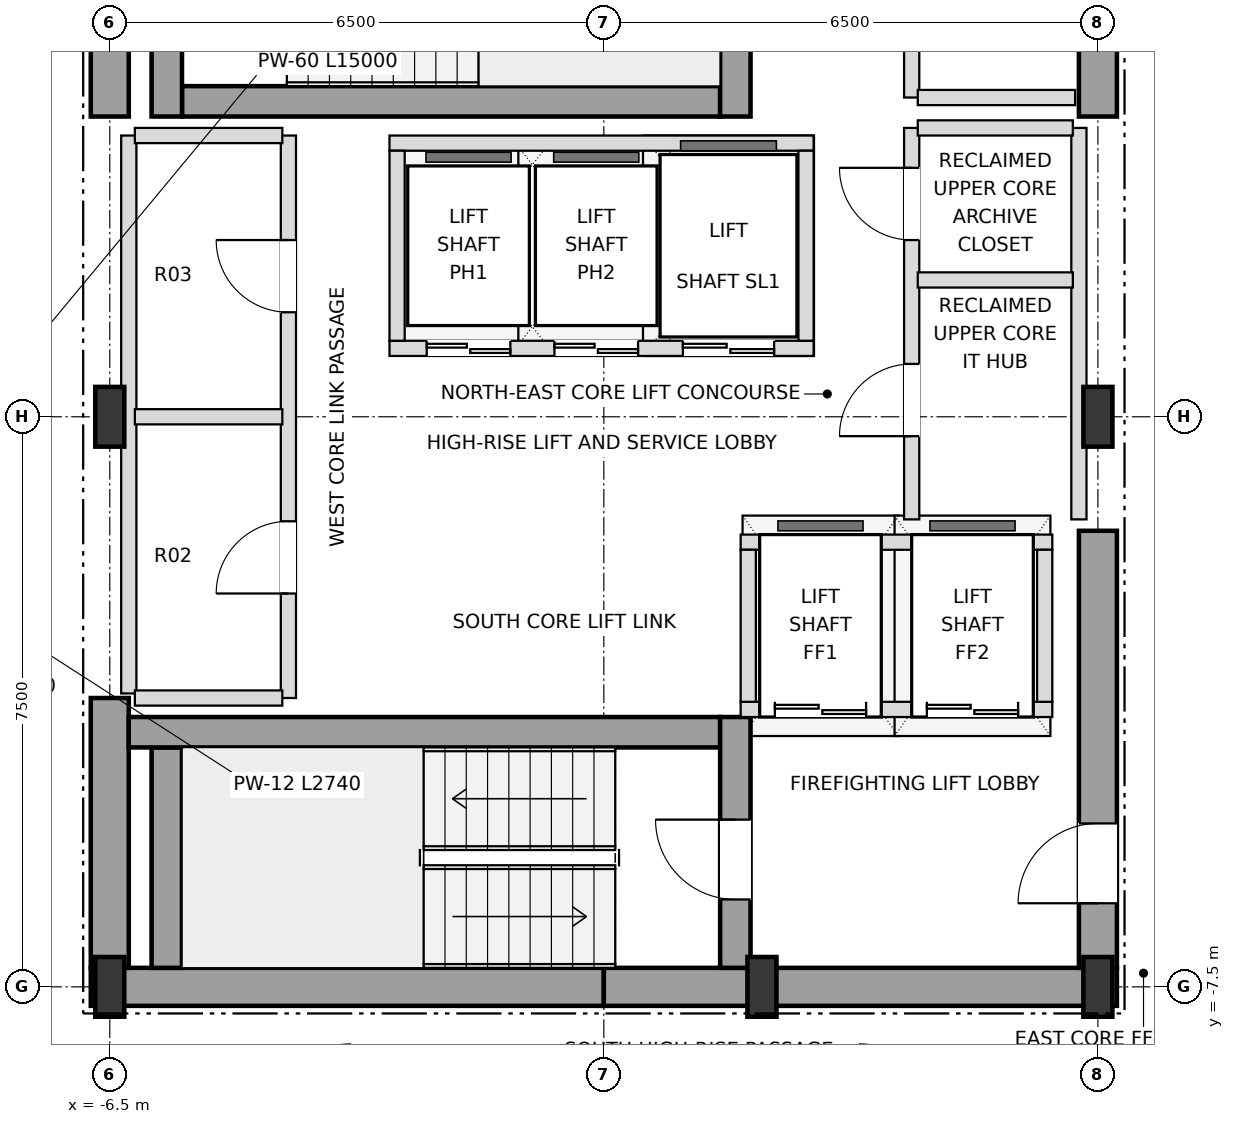
"""IFC4 building model, lengths in metres.
Left out: names, types, materials, properties, quantities, classifications, styles, units other than length and angle.
Written with IfcOpenShell. Run it as: python <this file> out.ifc"""

import sys

from ifc_helpers import new_model, si_unit, direction, frame, frame_2d, origin, origin_2d, place, context, subcontext, project, spatial, rectangle, i_section, extrude, element, fill, save


model = new_model("IFC4")
c1 = context("Model", 3, precision=1e-05, world=origin(), true_north=direction((0.0, 1.0)))
c2 = subcontext(c1, "Body", "Model", "MODEL_VIEW")
j1 = project(units=[si_unit("LENGTHUNIT", "METRE"), si_unit("PLANEANGLEUNIT", "RADIAN")], contexts=[c1])
p1 = place(None, origin())
s1 = spatial("IfcSite", under=j1, at=p1, CompositionType="ELEMENT")
p2 = place(p1, origin())
s2 = spatial("IfcBuilding", under=s1, at=p2, CompositionType="ELEMENT")
p3 = place(p2, frame((0.0, 0.0, 287.1)))
s3 = spatial("IfcBuildingStorey", under=s2, at=p3, CompositionType="ELEMENT", Elevation=287.1)
for number, where, z_axis, x_axis in (
    (1, (-6.5, -7.5, 0.0), (0.0, 0.0, 1.0), (1.0, 0.0, 0.0)),
    (2, (2.08, -7.5, 0.0), (0.0, 0.0, 1.0), (1.0, 0.0, 0.0)),
    (3, (6.5, -7.5, 0.0), (0.0, 0.0, 1.0), (1.0, 0.0, 0.0)),
    (4, (-6.5, 0.0, 0.0), (0.0, 0.0, 1.0), (1.0, 0.0, 0.0)),
    (5, (6.5, 0.0, 0.0), (0.0, 0.0, 1.0), (1.0, 0.0, 0.0)),
):
    element("IfcColumn", number, at=place(p3, frame(where, z_axis=z_axis, x_axis=x_axis)), inside=s3, PredefinedType="COLUMN", context=c2, shape_type="SweptSolid", body=[
        extrude(i_section(OverallWidth=0.382, OverallDepth=0.786, WebThickness=0.02, FlangeThickness=0.033, at=origin_2d()), origin(), (0.0, 0.0, 1.0), 3.6),
    ])
for number, where, z_axis, x_axis in (
    (6, (-6.75, -7.5, 0.0), (0.0, 0.0, 1.0), (1.0, 0.0, 0.0)),
    (7, (0.0, -7.5, 0.0), (0.0, 0.0, 1.0), (1.0, 0.0, 0.0)),
):
    element("IfcWall", number, at=place(p3, frame(where, z_axis=z_axis, x_axis=x_axis)), inside=s3, PredefinedType="SHEAR", context=c2, shape_type="SweptSolid", body=[
        extrude(rectangle(XDim=6.75, YDim=0.5, at=frame_2d((3.375, 0.0))), origin(), (0.0, 0.0, 1.0), 3.38),
    ])
p4 = place(p3, frame((-6.5, -7.25, 0.0), z_axis=(0.0, 0.0, 1.0), x_axis=(0.0, 1.0, 0.0)))
e8 = element("IfcWall", 8, at=p4, inside=s3, PredefinedType="SHEAR", context=c2, shape_type="SweptSolid", body=[
    extrude(rectangle(XDim=3.55, YDim=0.5, at=frame_2d((1.775, 0.0))), origin(), (0.0, 0.0, 1.0), 3.38),
])
p5 = place(p3, frame((-6.5, 3.95, 0.0), z_axis=(0.0, 0.0, 1.0), x_axis=(0.0, 1.0, 0.0)))
e9 = element("IfcWall", 9, at=p5, inside=s3, PredefinedType="SHEAR", context=c2, shape_type="SweptSolid", body=[
    extrude(rectangle(XDim=3.3, YDim=0.5, at=frame_2d((1.65, 0.0))), origin(), (0.0, 0.0, 1.0), 3.38),
])
p6 = place(p3, frame((6.5, -7.25, 0.0), z_axis=(0.0, 0.0, 1.0), x_axis=(0.0, 1.0, 0.0)))
e10 = element("IfcWall", 10, at=p6, inside=s3, PredefinedType="SHEAR", context=c2, shape_type="SweptSolid", body=[
    extrude(rectangle(XDim=5.75, YDim=0.5, at=frame_2d((2.875, 0.0))), origin(), (0.0, 0.0, 1.0), 3.38),
])
p7 = place(p6, frame((0.85, 0.0, 0.0)))
e11 = element("IfcOpeningElement", 11, at=p7, cuts=e10, PredefinedType="OPENING", context=c2, shape_type="SweptSolid", body=[
    extrude(rectangle(XDim=1.05, YDim=2.15, at=frame_2d((0.525, 1.075))), frame((0.0, 0.26, 0.0), z_axis=(0.0, -1.0, 0.0), x_axis=(1.0, 0.0, 0.0)), (0.0, 0.0, 1.0), 0.52),
])
p8 = place(p3, frame((6.5, 3.95, 0.0), z_axis=(0.0, 0.0, 1.0), x_axis=(0.0, 1.0, 0.0)))
e12 = element("IfcWall", 12, at=p8, inside=s3, PredefinedType="SHEAR", context=c2, shape_type="SweptSolid", body=[
    extrude(rectangle(XDim=3.3, YDim=0.5, at=frame_2d((1.65, 0.0))), origin(), (0.0, 0.0, 1.0), 3.38),
])
p9 = place(p3, frame((-5.75, -7.25, 0.0), z_axis=(0.0, 0.0, 1.0), x_axis=(0.0, 1.0, 0.0)))
e13 = element("IfcWall", 13, at=p9, inside=s3, PredefinedType="SHEAR", context=c2, shape_type="SweptSolid", body=[
    extrude(rectangle(XDim=2.9, YDim=0.4, at=frame_2d((1.45, 0.0))), origin(), (0.0, 0.0, 1.0), 3.38),
])
p10 = place(p3, frame((-6.25, -4.15, 0.0), z_axis=(0.0, 0.0, 1.0), x_axis=(1.0, 0.0, 0.0)))
e14 = element("IfcWall", 14, at=p10, inside=s3, PredefinedType="SHEAR", context=c2, shape_type="SweptSolid", body=[
    extrude(rectangle(XDim=7.78, YDim=0.4, at=frame_2d((3.89, 0.0))), origin(), (0.0, 0.0, 1.0), 3.38),
])
p11 = place(p3, frame((1.73, -7.25, 0.0), z_axis=(0.0, 0.0, 1.0), x_axis=(0.0, 1.0, 0.0)))
e15 = element("IfcWall", 15, at=p11, inside=s3, PredefinedType="SHEAR", context=c2, shape_type="SweptSolid", body=[
    extrude(rectangle(XDim=3.3, YDim=0.4, at=frame_2d((1.65, 0.0))), origin(), (0.0, 0.0, 1.0), 3.38),
])
p12 = place(p11, frame((0.9, 0.0, 0.0)))
e16 = element("IfcOpeningElement", 16, at=p12, cuts=e15, PredefinedType="OPENING", context=c2, shape_type="SweptSolid", body=[
    extrude(rectangle(XDim=1.05, YDim=2.15, at=frame_2d((0.525, 1.075))), frame((0.0, 0.21, 0.0), z_axis=(0.0, -1.0, 0.0), x_axis=(1.0, 0.0, 0.0)), (0.0, 0.0, 1.0), 0.42),
])
p13 = place(p3, frame((-5.55, 4.15, 0.0), z_axis=(0.0, 0.0, 1.0), x_axis=(1.0, 0.0, 0.0)))
e17 = element("IfcWall", 17, at=p13, inside=s3, PredefinedType="SHEAR", context=c2, shape_type="SweptSolid", body=[
    extrude(rectangle(XDim=7.08, YDim=0.4, at=frame_2d((3.54, 0.0))), origin(), (0.0, 0.0, 1.0), 3.38),
])
for number, where, z_axis, x_axis in (
    (18, (1.73, 3.95, 0.0), (0.0, 0.0, 1.0), (0.0, 1.0, 0.0)),
    (19, (-5.75, 3.95, 0.0), (0.0, 0.0, 1.0), (0.0, 1.0, 0.0)),
):
    element("IfcWall", number, at=place(p3, frame(where, z_axis=z_axis, x_axis=x_axis)), inside=s3, PredefinedType="SHEAR", context=c2, shape_type="SweptSolid", body=[
        extrude(rectangle(XDim=3.3, YDim=0.4, at=frame_2d((1.65, 0.0))), origin(), (0.0, 0.0, 1.0), 3.38),
    ])
p14 = place(p3, frame((-2.82, 0.9, 0.0), z_axis=(0.0, 0.0, 1.0), x_axis=(1.0, 0.0, 0.0)))
e20 = element("IfcWall", 20, at=p14, inside=s3, PredefinedType="SOLIDWALL", context=c2, shape_type="SweptSolid", body=[
    extrude(rectangle(XDim=5.58, YDim=0.2, at=frame_2d((2.79, 0.0))), origin(), (0.0, 0.0, 1.0), 3.38),
])
p15 = place(p14, frame((0.49, 0.0, 0.0)))
e21 = element("IfcOpeningElement", 21, at=p15, cuts=e20, PredefinedType="OPENING", context=c2, shape_type="SweptSolid", body=[
    extrude(rectangle(XDim=1.1, YDim=2.15, at=frame_2d((0.55, 1.075))), frame((0.0, 0.11, 0.0), z_axis=(0.0, -1.0, 0.0), x_axis=(1.0, 0.0, 0.0)), (0.0, 0.0, 1.0), 0.22),
])
p16 = place(p14, frame((2.17, 0.0, 0.0)))
e22 = element("IfcOpeningElement", 22, at=p16, cuts=e20, PredefinedType="OPENING", context=c2, shape_type="SweptSolid", body=[
    extrude(rectangle(XDim=1.1, YDim=2.15, at=frame_2d((0.55, 1.075))), frame((0.0, 0.11, 0.0), z_axis=(0.0, -1.0, 0.0), x_axis=(1.0, 0.0, 0.0)), (0.0, 0.0, 1.0), 0.22),
])
p17 = place(p14, frame((3.86, 0.0, 0.0)))
e23 = element("IfcOpeningElement", 23, at=p17, cuts=e20, PredefinedType="OPENING", context=c2, shape_type="SweptSolid", body=[
    extrude(rectangle(XDim=1.2, YDim=2.2, at=frame_2d((0.6, 1.1))), frame((0.0, 0.11, 0.0), z_axis=(0.0, -1.0, 0.0), x_axis=(1.0, 0.0, 0.0)), (0.0, 0.0, 1.0), 0.22),
])
p18 = place(p3, frame((-2.82, 3.6, 0.0), z_axis=(0.0, 0.0, 1.0), x_axis=(1.0, 0.0, 0.0)))
e24 = element("IfcWall", 24, at=p18, inside=s3, PredefinedType="SOLIDWALL", context=c2, shape_type="SweptSolid", body=[
    extrude(rectangle(XDim=5.58, YDim=0.2, at=frame_2d((2.79, 0.0))), origin(), (0.0, 0.0, 1.0), 3.38),
])
for number, where, z_axis, x_axis in (
    (25, (-2.72, 1.0, 0.0), (0.0, 0.0, 1.0), (0.0, 1.0, 0.0)),
    (26, (2.66, 1.0, 0.0), (0.0, 0.0, 1.0), (0.0, 1.0, 0.0)),
):
    element("IfcWall", number, at=place(p3, frame(where, z_axis=z_axis, x_axis=x_axis)), inside=s3, PredefinedType="SOLIDWALL", context=c2, shape_type="SweptSolid", body=[
        extrude(rectangle(XDim=2.5, YDim=0.2, at=frame_2d((1.25, 0.0))), origin(), (0.0, 0.0, 1.0), 3.38),
    ])
p19 = place(p3, frame((1.8, -3.85, 0.0), z_axis=(0.0, 0.0, 1.0), x_axis=(1.0, 0.0, 0.0)))
e27 = element("IfcWall", 27, at=p19, inside=s3, PredefinedType="SOLIDWALL", context=c2, shape_type="SweptSolid", body=[
    extrude(rectangle(XDim=4.1, YDim=0.2, at=frame_2d((2.05, 0.0))), origin(), (0.0, 0.0, 1.0), 3.38),
])
p20 = place(p19, frame((0.45, 0.0, 0.0)))
e28 = element("IfcOpeningElement", 28, at=p20, cuts=e27, PredefinedType="OPENING", context=c2, shape_type="SweptSolid", body=[
    extrude(rectangle(XDim=1.2, YDim=2.2, at=frame_2d((0.6, 1.1))), frame((0.0, 0.11, 0.0), z_axis=(0.0, -1.0, 0.0), x_axis=(1.0, 0.0, 0.0)), (0.0, 0.0, 1.0), 0.22),
])
p21 = place(p19, frame((2.45, 0.0, 0.0)))
e29 = element("IfcOpeningElement", 29, at=p21, cuts=e27, PredefinedType="OPENING", context=c2, shape_type="SweptSolid", body=[
    extrude(rectangle(XDim=1.2, YDim=2.2, at=frame_2d((0.6, 1.1))), frame((0.0, 0.11, 0.0), z_axis=(0.0, -1.0, 0.0), x_axis=(1.0, 0.0, 0.0)), (0.0, 0.0, 1.0), 0.22),
])
p22 = place(p3, frame((1.8, -1.65, 0.0), z_axis=(0.0, 0.0, 1.0), x_axis=(1.0, 0.0, 0.0)))
e30 = element("IfcWall", 30, at=p22, inside=s3, PredefinedType="SOLIDWALL", context=c2, shape_type="SweptSolid", body=[
    extrude(rectangle(XDim=4.1, YDim=0.2, at=frame_2d((2.05, 0.0))), origin(), (0.0, 0.0, 1.0), 3.38),
])
for number, where, z_axis, x_axis in (
    (31, (1.9, -3.75, 0.0), (0.0, 0.0, 1.0), (0.0, 1.0, 0.0)),
    (32, (5.8, -3.75, 0.0), (0.0, 0.0, 1.0), (0.0, 1.0, 0.0)),
):
    element("IfcWall", number, at=place(p3, frame(where, z_axis=z_axis, x_axis=x_axis)), inside=s3, PredefinedType="SOLIDWALL", context=c2, shape_type="SweptSolid", body=[
        extrude(rectangle(XDim=2.0, YDim=0.2, at=frame_2d((1.0, 0.0))), origin(), (0.0, 0.0, 1.0), 3.38),
    ])
p23 = place(p3, frame((-6.25, -3.64, 0.0), z_axis=(0.0, 0.0, 1.0), x_axis=(0.0, 1.0, 0.0)))
e33 = element("IfcWall", 33, at=p23, inside=s3, PredefinedType="SOLIDWALL", context=c2, shape_type="SweptSolid", body=[
    extrude(rectangle(XDim=7.34, YDim=0.2, at=frame_2d((3.67, 0.0))), origin(), (0.0, 0.0, 1.0), 3.38),
])
p24 = place(p3, frame((-4.15, -3.7, 0.0), z_axis=(0.0, 0.0, 1.0), x_axis=(0.0, 1.0, 0.0)))
e34 = element("IfcWall", 34, at=p24, inside=s3, PredefinedType="SOLIDWALL", context=c2, shape_type="SweptSolid", body=[
    extrude(rectangle(XDim=7.4, YDim=0.2, at=frame_2d((3.7, 0.0))), origin(), (0.0, 0.0, 1.0), 3.38),
])
p25 = place(p24, frame((1.375, 0.0, 0.0)))
e35 = element("IfcOpeningElement", 35, at=p25, cuts=e34, PredefinedType="OPENING", context=c2, shape_type="SweptSolid", body=[
    extrude(rectangle(XDim=0.95, YDim=2.15, at=frame_2d((0.475, 1.075))), frame((0.0, 0.11, 0.0), z_axis=(0.0, -1.0, 0.0), x_axis=(1.0, 0.0, 0.0)), (0.0, 0.0, 1.0), 0.22),
])
p26 = place(p24, frame((5.075, 0.0, 0.0)))
e36 = element("IfcOpeningElement", 36, at=p26, cuts=e34, PredefinedType="OPENING", context=c2, shape_type="SweptSolid", body=[
    extrude(rectangle(XDim=0.95, YDim=2.15, at=frame_2d((0.475, 1.075))), frame((0.0, 0.11, 0.0), z_axis=(0.0, -1.0, 0.0), x_axis=(1.0, 0.0, 0.0)), (0.0, 0.0, 1.0), 0.22),
])
p27 = place(p3, frame((4.05, -1.35, 0.0), z_axis=(0.0, 0.0, 1.0), x_axis=(0.0, 1.0, 0.0)))
e37 = element("IfcWall", 37, at=p27, inside=s3, PredefinedType="SOLIDWALL", context=c2, shape_type="SweptSolid", body=[
    extrude(rectangle(XDim=5.15, YDim=0.2, at=frame_2d((2.575, 0.0))), origin(), (0.0, 0.0, 1.0), 3.38),
])
p28 = place(p27, frame((1.095, 0.0, 0.0)))
e38 = element("IfcOpeningElement", 38, at=p28, cuts=e37, PredefinedType="OPENING", context=c2, shape_type="SweptSolid", body=[
    extrude(rectangle(XDim=0.95, YDim=2.15, at=frame_2d((0.475, 1.075))), frame((0.0, 0.11, 0.0), z_axis=(0.0, -1.0, 0.0), x_axis=(1.0, 0.0, 0.0)), (0.0, 0.0, 1.0), 0.22),
])
p29 = place(p27, frame((3.675, 0.0, 0.0)))
e39 = element("IfcOpeningElement", 39, at=p29, cuts=e37, PredefinedType="OPENING", context=c2, shape_type="SweptSolid", body=[
    extrude(rectangle(XDim=0.95, YDim=2.15, at=frame_2d((0.475, 1.075))), frame((0.0, 0.11, 0.0), z_axis=(0.0, -1.0, 0.0), x_axis=(1.0, 0.0, 0.0)), (0.0, 0.0, 1.0), 0.22),
])
p30 = place(p3, frame((4.05, 4.2, 0.0), z_axis=(0.0, 0.0, 1.0), x_axis=(0.0, 1.0, 0.0)))
e40 = element("IfcWall", 40, at=p30, inside=s3, PredefinedType="SOLIDWALL", context=c2, shape_type="SweptSolid", body=[
    extrude(rectangle(XDim=3.05, YDim=0.2, at=frame_2d((1.525, 0.0))), origin(), (0.0, 0.0, 1.0), 3.38),
])
p31 = place(p30, frame((0.975, 0.0, 0.0)))
e41 = element("IfcOpeningElement", 41, at=p31, cuts=e40, PredefinedType="OPENING", context=c2, shape_type="SweptSolid", body=[
    extrude(rectangle(XDim=0.95, YDim=2.15, at=frame_2d((0.475, 1.075))), frame((0.0, 0.11, 0.0), z_axis=(0.0, -1.0, 0.0), x_axis=(1.0, 0.0, 0.0)), (0.0, 0.0, 1.0), 0.22),
])
p32 = place(p3, frame((6.25, -1.35, 0.0), z_axis=(0.0, 0.0, 1.0), x_axis=(0.0, 1.0, 0.0)))
e42 = element("IfcWall", 42, at=p32, inside=s3, PredefinedType="SOLIDWALL", context=c2, shape_type="SweptSolid", body=[
    extrude(rectangle(XDim=5.15, YDim=0.2, at=frame_2d((2.575, 0.0))), origin(), (0.0, 0.0, 1.0), 3.38),
])
for number, where, z_axis, x_axis in (
    (43, (-6.17, -3.7, 0.0), (0.0, 0.0, 1.0), (1.0, 0.0, 0.0)),
    (44, (-6.17, 0.0, 0.0), (0.0, 0.0, 1.0), (1.0, 0.0, 0.0)),
):
    element("IfcWall", number, at=place(p3, frame(where, z_axis=z_axis, x_axis=x_axis)), inside=s3, PredefinedType="SOLIDWALL", context=c2, shape_type="SweptSolid", body=[
        extrude(rectangle(XDim=1.94, YDim=0.2, at=frame_2d((0.97, 0.0))), origin(), (0.0, 0.0, 1.0), 3.38),
    ])
p33 = place(p3, frame((4.13, 1.8, 0.0), z_axis=(0.0, 0.0, 1.0), x_axis=(1.0, 0.0, 0.0)))
e45 = element("IfcWall", 45, at=p33, inside=s3, PredefinedType="SOLIDWALL", context=c2, shape_type="SweptSolid", body=[
    extrude(rectangle(XDim=2.04, YDim=0.2, at=frame_2d((1.02, 0.0))), origin(), (0.0, 0.0, 1.0), 3.38),
])
p34 = place(p3, frame((-6.17, 3.7, 0.0), z_axis=(0.0, 0.0, 1.0), x_axis=(1.0, 0.0, 0.0)))
e46 = element("IfcWall", 46, at=p34, inside=s3, PredefinedType="SOLIDWALL", context=c2, shape_type="SweptSolid", body=[
    extrude(rectangle(XDim=1.94, YDim=0.2, at=frame_2d((0.97, 0.0))), origin(), (0.0, 0.0, 1.0), 3.38),
])
p35 = place(p3, frame((4.13, 3.8, 0.0), z_axis=(0.0, 0.0, 1.0), x_axis=(1.0, 0.0, 0.0)))
e47 = element("IfcWall", 47, at=p35, inside=s3, PredefinedType="SOLIDWALL", context=c2, shape_type="SweptSolid", body=[
    extrude(rectangle(XDim=2.04, YDim=0.2, at=frame_2d((1.02, 0.0))), origin(), (0.0, 0.0, 1.0), 3.38),
])
p36 = place(p3, frame((4.13, 4.2, 0.0), z_axis=(0.0, 0.0, 1.0), x_axis=(1.0, 0.0, 0.0)))
e48 = element("IfcWall", 48, at=p36, inside=s3, PredefinedType="SOLIDWALL", context=c2, shape_type="SweptSolid", body=[
    extrude(rectangle(XDim=2.07, YDim=0.2, at=frame_2d((1.035, 0.0))), origin(), (0.0, 0.0, 1.0), 3.38),
])
p37 = place(p7, origin())
e49 = element("IfcDoor", 49, at=p37, inside=s3, OperationType="SINGLE_SWING_LEFT", PredefinedType="DOOR", context=c2, shape_type="SweptSolid", body=[
    extrude(rectangle(XDim=1.05, YDim=2.15, at=frame_2d((0.525, 1.075))), frame((0.0, 0.025, 0.0), z_axis=(0.0, -1.0, 0.0), x_axis=(1.0, 0.0, 0.0)), (0.0, 0.0, 1.0), 0.05),
])
fill(e11, e49)
p38 = place(p12, origin())
e50 = element("IfcDoor", 50, at=p38, inside=s3, OperationType="SINGLE_SWING_RIGHT", PredefinedType="DOOR", context=c2, shape_type="SweptSolid", body=[
    extrude(rectangle(XDim=1.05, YDim=2.15, at=frame_2d((0.525, 1.075))), frame((0.0, 0.025, 0.0), z_axis=(0.0, -1.0, 0.0), x_axis=(1.0, 0.0, 0.0)), (0.0, 0.0, 1.0), 0.05),
])
fill(e16, e50)
p39 = place(p15, origin())
e51 = element("IfcDoor", 51, at=p39, inside=s3, OperationType="DOUBLE_DOOR_SLIDING", PredefinedType="DOOR", context=c2, shape_type="SweptSolid", body=[
    extrude(rectangle(XDim=1.1, YDim=2.15, at=frame_2d((0.55, 1.075))), frame((0.0, 0.025, 0.0), z_axis=(0.0, -1.0, 0.0), x_axis=(1.0, 0.0, 0.0)), (0.0, 0.0, 1.0), 0.05),
])
fill(e21, e51)
p40 = place(p16, origin())
e52 = element("IfcDoor", 52, at=p40, inside=s3, OperationType="DOUBLE_DOOR_SLIDING", PredefinedType="DOOR", context=c2, shape_type="SweptSolid", body=[
    extrude(rectangle(XDim=1.1, YDim=2.15, at=frame_2d((0.55, 1.075))), frame((0.0, 0.025, 0.0), z_axis=(0.0, -1.0, 0.0), x_axis=(1.0, 0.0, 0.0)), (0.0, 0.0, 1.0), 0.05),
])
fill(e22, e52)
p41 = place(p17, origin())
e53 = element("IfcDoor", 53, at=p41, inside=s3, OperationType="DOUBLE_DOOR_SLIDING", PredefinedType="DOOR", context=c2, shape_type="SweptSolid", body=[
    extrude(rectangle(XDim=1.2, YDim=2.2, at=frame_2d((0.6, 1.1))), frame((0.0, 0.025, 0.0), z_axis=(0.0, -1.0, 0.0), x_axis=(1.0, 0.0, 0.0)), (0.0, 0.0, 1.0), 0.05),
])
fill(e23, e53)
p42 = place(p20, origin())
e54 = element("IfcDoor", 54, at=p42, inside=s3, OperationType="DOUBLE_DOOR_SLIDING", PredefinedType="DOOR", context=c2, shape_type="SweptSolid", body=[
    extrude(rectangle(XDim=1.2, YDim=2.2, at=frame_2d((0.6, 1.1))), frame((0.0, 0.025, 0.0), z_axis=(0.0, -1.0, 0.0), x_axis=(1.0, 0.0, 0.0)), (0.0, 0.0, 1.0), 0.05),
])
fill(e28, e54)
p43 = place(p21, origin())
e55 = element("IfcDoor", 55, at=p43, inside=s3, OperationType="DOUBLE_DOOR_SLIDING", PredefinedType="DOOR", context=c2, shape_type="SweptSolid", body=[
    extrude(rectangle(XDim=1.2, YDim=2.2, at=frame_2d((0.6, 1.1))), frame((0.0, 0.025, 0.0), z_axis=(0.0, -1.0, 0.0), x_axis=(1.0, 0.0, 0.0)), (0.0, 0.0, 1.0), 0.05),
])
fill(e29, e55)
p44 = place(p25, origin())
e56 = element("IfcDoor", 56, at=p44, inside=s3, OperationType="SINGLE_SWING_LEFT", PredefinedType="DOOR", context=c2, shape_type="SweptSolid", body=[
    extrude(rectangle(XDim=0.95, YDim=2.15, at=frame_2d((0.475, 1.075))), frame((0.0, 0.025, 0.0), z_axis=(0.0, -1.0, 0.0), x_axis=(1.0, 0.0, 0.0)), (0.0, 0.0, 1.0), 0.05),
])
fill(e35, e56)
p45 = place(p26, origin())
e57 = element("IfcDoor", 57, at=p45, inside=s3, OperationType="SINGLE_SWING_RIGHT", PredefinedType="DOOR", context=c2, shape_type="SweptSolid", body=[
    extrude(rectangle(XDim=0.95, YDim=2.15, at=frame_2d((0.475, 1.075))), frame((0.0, 0.025, 0.0), z_axis=(0.0, -1.0, 0.0), x_axis=(1.0, 0.0, 0.0)), (0.0, 0.0, 1.0), 0.05),
])
fill(e36, e57)
p46 = place(p28, origin())
e58 = element("IfcDoor", 58, at=p46, inside=s3, OperationType="SINGLE_SWING_LEFT", PredefinedType="DOOR", context=c2, shape_type="SweptSolid", body=[
    extrude(rectangle(XDim=0.95, YDim=2.15, at=frame_2d((0.475, 1.075))), frame((0.0, 0.025, 0.0), z_axis=(0.0, -1.0, 0.0), x_axis=(1.0, 0.0, 0.0)), (0.0, 0.0, 1.0), 0.05),
])
fill(e38, e58)
p47 = place(p29, origin())
e59 = element("IfcDoor", 59, at=p47, inside=s3, OperationType="SINGLE_SWING_RIGHT", PredefinedType="DOOR", context=c2, shape_type="SweptSolid", body=[
    extrude(rectangle(XDim=0.95, YDim=2.15, at=frame_2d((0.475, 1.075))), frame((0.0, 0.025, 0.0), z_axis=(0.0, -1.0, 0.0), x_axis=(1.0, 0.0, 0.0)), (0.0, 0.0, 1.0), 0.05),
])
fill(e39, e59)
save(model, sys.argv[1])
